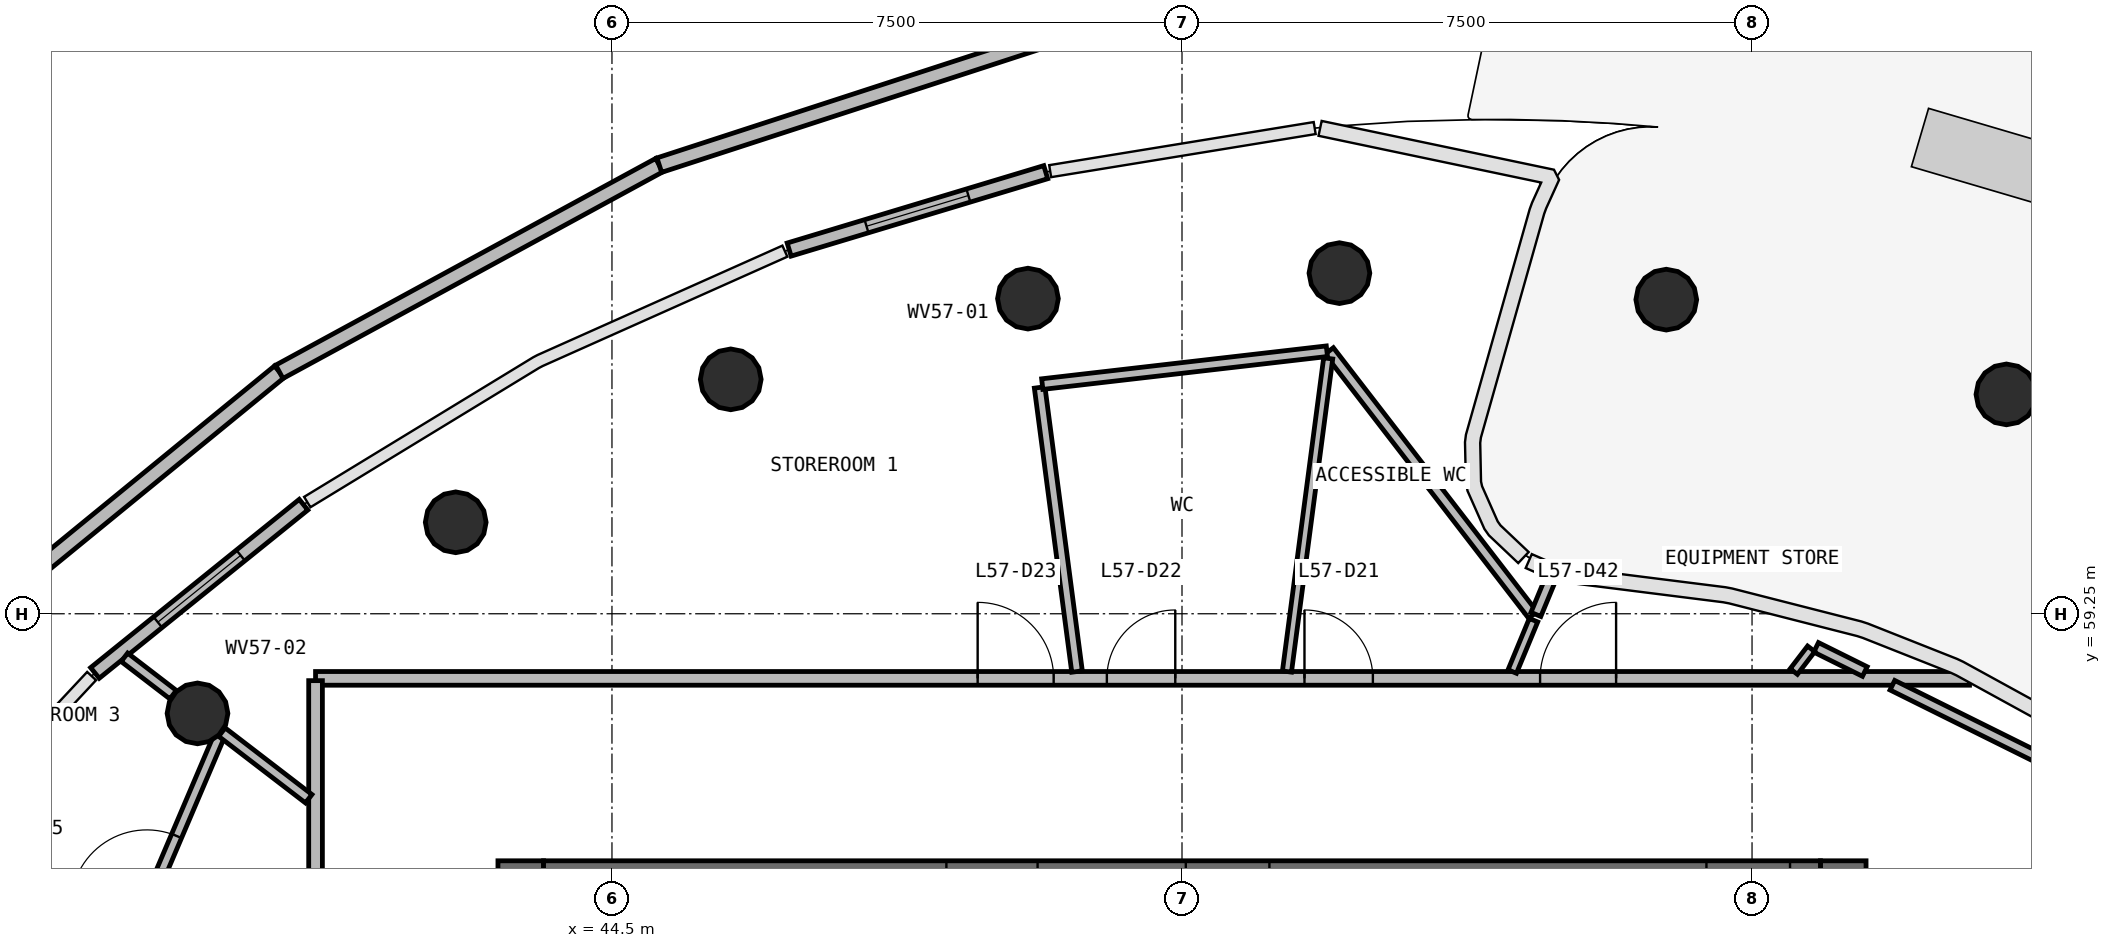
"""IFC4 building model, lengths in metres.
Left out: names, types, materials, properties, quantities, classifications, styles, units other than length and angle.
Written with IfcOpenShell. Run it as: python <this file> out.ifc"""

import sys

from ifc_helpers import new_model, si_unit, direction, frame, frame_2d, origin, origin_2d, place, context, subcontext, project, spatial, rectangle, circle, extrude, source, transform, mapped, element, fill, save


model = new_model("IFC4")
c1 = context("Model", 3, precision=1e-05, world=origin(), true_north=direction((0.0, 1.0)))
c2 = subcontext(c1, "Body", "Model", "MODEL_VIEW")
j1 = project(units=[si_unit("LENGTHUNIT", "METRE"), si_unit("PLANEANGLEUNIT", "RADIAN")], contexts=[c1])
p1 = place(None, origin())
s1 = spatial("IfcSite", under=j1, at=p1, CompositionType="ELEMENT")
p2 = place(p1, origin())
s2 = spatial("IfcBuilding", under=s1, at=p2, CompositionType="ELEMENT")
p3 = place(p2, frame((0.0, 0.0, 234.5)))
s3 = spatial("IfcBuildingStorey", under=s2, at=p3, CompositionType="ELEMENT", Elevation=234.5)
p4 = place(p3, frame((60.7, 40.0, 0.0), z_axis=(0.0, 0.0, 1.0), x_axis=(0.0, 1.0, 0.0)))
e1 = element("IfcWall", 1, at=p4, inside=s3, PredefinedType="SHEAR", context=c2, shape_type="SweptSolid", body=[
    extrude(rectangle(XDim=16.0, YDim=0.6, at=frame_2d((8.0, 0.0))), origin(), (0.0, 0.0, 1.0), 3.9),
])
p5 = place(p4, frame((7.1, 0.0, 0.0)))
e2 = element("IfcOpeningElement", 2, at=p5, cuts=e1, PredefinedType="OPENING", context=c2, shape_type="SweptSolid", body=[
    extrude(rectangle(XDim=1.8, YDim=2.1, at=frame_2d((0.9, 1.05))), frame((0.0, 0.31, 0.0), z_axis=(0.0, -1.0, 0.0), x_axis=(1.0, 0.0, 0.0)), (0.0, 0.0, 1.0), 0.62),
])
p6 = place(p3, frame((43.3, 56.0, 0.0), z_axis=(0.0, 0.0, 1.0), x_axis=(0.0, -1.0, 0.0)))
e3 = element("IfcWall", 3, at=p6, inside=s3, PredefinedType="SHEAR", context=c2, shape_type="SweptSolid", body=[
    extrude(rectangle(XDim=16.0, YDim=0.6, at=frame_2d((8.0, 0.0))), origin(), (0.0, 0.0, 1.0), 3.9),
])
p7 = place(p6, frame((7.1, 0.0, 0.0)))
e4 = element("IfcOpeningElement", 4, at=p7, cuts=e3, PredefinedType="OPENING", context=c2, shape_type="SweptSolid", body=[
    extrude(rectangle(XDim=1.8, YDim=2.1, at=frame_2d((0.9, 1.05))), frame((0.0, 0.31, 0.0), z_axis=(0.0, -1.0, 0.0), x_axis=(1.0, 0.0, 0.0)), (0.0, 0.0, 1.0), 0.62),
])
p8 = place(p3, frame((60.4, 55.7, 0.0), z_axis=(0.0, 0.0, 1.0), x_axis=(-1.0, 0.0, 0.0)))
e5 = element("IfcWall", 5, at=p8, inside=s3, PredefinedType="SHEAR", context=c2, shape_type="SweptSolid", body=[
    extrude(rectangle(XDim=16.8, YDim=0.6, at=frame_2d((8.4, 0.0))), origin(), (0.0, 0.0, 1.0), 3.9),
])
p9 = place(p8, frame((0.4, 0.0, 0.0)))
e6 = element("IfcOpeningElement", 6, at=p9, cuts=e5, PredefinedType="OPENING", context=c2, shape_type="SweptSolid", body=[
    extrude(rectangle(XDim=1.1, YDim=2.1, at=frame_2d((0.55, 1.05))), frame((0.0, 0.31, 0.0), z_axis=(0.0, -1.0, 0.0), x_axis=(1.0, 0.0, 0.0)), (0.0, 0.0, 1.0), 0.62),
])
p10 = place(p8, frame((10.3, 0.0, 0.0)))
e7 = element("IfcOpeningElement", 7, at=p10, cuts=e5, PredefinedType="OPENING", context=c2, shape_type="SweptSolid", body=[
    extrude(rectangle(XDim=1.2, YDim=2.1, at=frame_2d((0.6, 1.05))), frame((0.0, 0.31, 0.0), z_axis=(0.0, -1.0, 0.0), x_axis=(1.0, 0.0, 0.0)), (0.0, 0.0, 1.0), 0.62),
])
p11 = place(p8, frame((7.25, 0.0, 0.0)))
e8 = element("IfcOpeningElement", 8, at=p11, cuts=e5, PredefinedType="OPENING", context=c2, shape_type="SweptSolid", body=[
    extrude(rectangle(XDim=1.1, YDim=2.1, at=frame_2d((0.55, 1.05))), frame((0.0, 0.31, 0.0), z_axis=(0.0, -1.0, 0.0), x_axis=(1.0, 0.0, 0.0)), (0.0, 0.0, 1.0), 0.62),
])
m1 = source(origin(), c2, "Body", "SweptSolid", [
    extrude(circle(Radius=0.4, at=origin_2d()), origin(), (0.0, 0.0, 1.0), 4.22),
])
for number, where, z_axis, x_axis in (
    (9, (62.847, 62.136, -0.32), (0.0, 0.0, 1.0), (1.0, 0.0, 0.0)),
    (10, (58.372, 63.383, -0.32), (0.0, 0.0, 1.0), (1.0, 0.0, 0.0)),
    (11, (54.071, 63.731, -0.32), (0.0, 0.0, 1.0), (1.0, 0.0, 0.0)),
    (12, (49.973, 63.396, -0.32), (0.0, 0.0, 1.0), (1.0, 0.0, 0.0)),
    (13, (46.063, 62.334, -0.32), (0.0, 0.0, 1.0), (1.0, 0.0, 0.0)),
    (14, (42.444, 60.453, -0.32), (0.0, 0.0, 1.0), (1.0, 0.0, 0.0)),
    (15, (39.047, 57.939, -0.32), (0.0, 0.0, 1.0), (1.0, 0.0, 0.0)),
):
    element("IfcColumn", number, at=place(p3, frame(where, z_axis=z_axis, x_axis=x_axis)), inside=s3, PredefinedType="COLUMN", context=c2, shape_type="MappedRepresentation", body=[
        mapped(m1, transform((0.0, 0.0, 0.0), scale=1.0)),
    ])
p12 = place(p3, frame((50.207, 65.059, 0.0), z_axis=(0.0, 0.0, 1.0), x_axis=(-0.957413689823, -0.288719633104, 0.0)))
e16 = element("IfcWall", 16, at=p12, inside=s3, PredefinedType="STANDARD", context=c2, shape_type="SweptSolid", body=[
    extrude(rectangle(XDim=3.526, YDim=0.18, at=frame_2d((1.763, 0.0))), origin(), (0.0, 0.0, 1.0), 3.58),
])
p13 = place(p12, frame((1.063, 0.0, 0.9)))
e17 = element("IfcOpeningElement", 17, at=p13, cuts=e16, PredefinedType="OPENING", context=c2, shape_type="SweptSolid", body=[
    extrude(rectangle(XDim=1.4, YDim=2.0, at=frame_2d((0.7, 1.0))), frame((0.0, 0.1, 0.0), z_axis=(0.0, -1.0, 0.0), x_axis=(1.0, 0.0, 0.0)), (0.0, 0.0, 1.0), 0.2),
])
p14 = place(p3, frame((40.442, 60.685, 0.0), z_axis=(0.0, 0.0, 1.0), x_axis=(-0.77832244361, -0.627864773477, 0.0)))
e18 = element("IfcWall", 18, at=p14, inside=s3, PredefinedType="STANDARD", context=c2, shape_type="SweptSolid", body=[
    extrude(rectangle(XDim=3.526, YDim=0.18, at=frame_2d((1.763, 0.0))), origin(), (0.0, 0.0, 1.0), 3.328),
])
p15 = place(p14, frame((1.063, 0.0, 0.9)))
e19 = element("IfcOpeningElement", 19, at=p15, cuts=e18, PredefinedType="OPENING", context=c2, shape_type="SweptSolid", body=[
    extrude(rectangle(XDim=1.4, YDim=2.0, at=frame_2d((0.7, 1.0))), frame((0.0, 0.1, 0.0), z_axis=(0.0, -1.0, 0.0), x_axis=(1.0, 0.0, 0.0)), (0.0, 0.0, 1.0), 0.2),
])
p16 = place(p3, frame((35.719, 58.832, 0.0), z_axis=(0.0, 0.0, 1.0), x_axis=(0.77415990789, 0.632990076554, 0.0)))
e20 = element("IfcWall", 20, at=p16, inside=s3, PredefinedType="PARAPET", context=c2, shape_type="SweptSolid", body=[
    extrude(rectangle(XDim=5.69, YDim=0.2, at=frame_2d((2.845, 0.0))), origin(), (0.0, 0.0, 1.0), 1.1),
])
p17 = place(p3, frame((40.124, 62.433, 0.0), z_axis=(0.0, 0.0, 1.0), x_axis=(0.878476952586, 0.477784725348, 0.0)))
e21 = element("IfcWall", 21, at=p17, inside=s3, PredefinedType="PARAPET", context=c2, shape_type="SweptSolid", body=[
    extrude(rectangle(XDim=5.691, YDim=0.2, at=frame_2d((2.845, 0.0))), origin(), (0.0, 0.0, 1.0), 1.1),
])
p18 = place(p3, frame((45.123, 65.152, 0.0), z_axis=(0.0, 0.0, 1.0), x_axis=(0.950936910484, 0.309384861103, 0.0)))
e22 = element("IfcWall", 22, at=p18, inside=s3, PredefinedType="PARAPET", context=c2, shape_type="SweptSolid", body=[
    extrude(rectangle(XDim=5.69, YDim=0.2, at=frame_2d((2.845, 0.0))), origin(), (0.0, 0.0, 1.0), 1.1),
])
p19 = place(p3, frame((40.6, 58.4, 0.0), z_axis=(0.0, 0.0, 1.0), x_axis=(1.0, 0.0, 0.0)))
e23 = element("IfcWall", 23, at=p19, inside=s3, PredefinedType="PARTITIONING", context=c2, shape_type="SweptSolid", body=[
    extrude(rectangle(XDim=21.761, YDim=0.18, at=frame_2d((10.881, 0.0))), origin(), (0.0, 0.0, 1.0), 2.88),
])
p20 = place(p19, frame((13.011, 0.0, 0.0)))
e24 = element("IfcOpeningElement", 24, at=p20, cuts=e23, PredefinedType="OPENING", context=c2, shape_type="SweptSolid", body=[
    extrude(rectangle(XDim=0.9, YDim=2.1, at=frame_2d((0.45, 1.05))), frame((0.0, 0.1, 0.0), z_axis=(0.0, -1.0, 0.0), x_axis=(1.0, 0.0, 0.0)), (0.0, 0.0, 1.0), 0.2),
])
p21 = place(p19, frame((10.411, 0.0, 0.0)))
e25 = element("IfcOpeningElement", 25, at=p21, cuts=e23, PredefinedType="OPENING", context=c2, shape_type="SweptSolid", body=[
    extrude(rectangle(XDim=0.9, YDim=2.1, at=frame_2d((0.45, 1.05))), frame((0.0, 0.1, 0.0), z_axis=(0.0, -1.0, 0.0), x_axis=(1.0, 0.0, 0.0)), (0.0, 0.0, 1.0), 0.2),
])
p22 = place(p19, frame((8.711, 0.0, 0.0)))
e26 = element("IfcOpeningElement", 26, at=p22, cuts=e23, PredefinedType="OPENING", context=c2, shape_type="SweptSolid", body=[
    extrude(rectangle(XDim=1.0, YDim=2.1, at=frame_2d((0.5, 1.05))), frame((0.0, 0.1, 0.0), z_axis=(0.0, -1.0, 0.0), x_axis=(1.0, 0.0, 0.0)), (0.0, 0.0, 1.0), 0.2),
])
p23 = place(p19, frame((16.111, 0.0, 0.0)))
e27 = element("IfcOpeningElement", 27, at=p23, cuts=e23, PredefinedType="OPENING", context=c2, shape_type="SweptSolid", body=[
    extrude(rectangle(XDim=1.0, YDim=2.1, at=frame_2d((0.5, 1.05))), frame((0.0, 0.1, 0.0), z_axis=(0.0, -1.0, 0.0), x_axis=(1.0, 0.0, 0.0)), (0.0, 0.0, 1.0), 0.2),
])
p24 = place(p3, frame((40.6, 37.63, 0.0), z_axis=(0.0, 0.0, 1.0), x_axis=(0.0, 1.0, 0.0)))
e28 = element("IfcWall", 28, at=p24, inside=s3, PredefinedType="PARTITIONING", context=c2, shape_type="SweptSolid", body=[
    extrude(rectangle(XDim=20.74, YDim=0.18, at=frame_2d((10.37, 0.0))), origin(), (0.0, 0.0, 1.0), 2.88),
])
p25 = place(p24, frame((9.89, 0.0, 0.0)))
e29 = element("IfcOpeningElement", 29, at=p25, cuts=e28, PredefinedType="OPENING", context=c2, shape_type="SweptSolid", body=[
    extrude(rectangle(XDim=1.0, YDim=2.1, at=frame_2d((0.5, 1.05))), frame((0.0, 0.1, 0.0), z_axis=(0.0, -1.0, 0.0), x_axis=(1.0, 0.0, 0.0)), (0.0, 0.0, 1.0), 0.2),
])
p26 = place(p24, frame((7.69, 0.0, 0.0)))
e30 = element("IfcOpeningElement", 30, at=p26, cuts=e28, PredefinedType="OPENING", context=c2, shape_type="SweptSolid", body=[
    extrude(rectangle(XDim=1.0, YDim=2.1, at=frame_2d((0.5, 1.05))), frame((0.0, 0.1, 0.0), z_axis=(0.0, -1.0, 0.0), x_axis=(1.0, 0.0, 0.0)), (0.0, 0.0, 1.0), 0.2),
])
p27 = place(p3, frame((56.616, 59.234, 0.0), z_axis=(0.0, 0.0, 1.0), x_axis=(-0.610799466813, 0.791785331603, 0.0)))
e31 = element("IfcWall", 31, at=p27, inside=s3, PredefinedType="PARTITIONING", context=c2, shape_type="SweptSolid", body=[
    extrude(rectangle(XDim=4.387, YDim=0.14, at=frame_2d((2.193, 0.0))), origin(), (0.0, 0.0, 1.0), 2.88),
])
p28 = place(p3, frame((37.741, 53.906, 0.0), z_axis=(0.0, 0.0, 1.0), x_axis=(0.391990538721, 0.919969248156, 0.0)))
e32 = element("IfcWall", 32, at=p28, inside=s3, PredefinedType="PARTITIONING", context=c2, shape_type="SweptSolid", body=[
    extrude(rectangle(XDim=4.081, YDim=0.14, at=frame_2d((2.041, 0.0))), origin(), (0.0, 0.0, 1.0), 2.88),
])
p29 = place(p28, frame((1.631, 0.0, 0.0)))
e33 = element("IfcOpeningElement", 33, at=p29, cuts=e32, PredefinedType="OPENING", context=c2, shape_type="SweptSolid", body=[
    extrude(rectangle(XDim=1.0, YDim=2.1, at=frame_2d((0.5, 1.05))), frame((0.0, 0.08, 0.0), z_axis=(0.0, -1.0, 0.0), x_axis=(1.0, 0.0, 0.0)), (0.0, 0.0, 1.0), 0.16),
])
p30 = place(p3, frame((50.619, 58.49, 0.0), z_axis=(0.0, 0.0, 1.0), x_axis=(-0.130504773783, 0.991447680929, 0.0)))
e34 = element("IfcWall", 34, at=p30, inside=s3, PredefinedType="PARTITIONING", context=c2, shape_type="SweptSolid", body=[
    extrude(rectangle(XDim=3.77, YDim=0.14, at=frame_2d((1.885, 0.0))), origin(), (0.0, 0.0, 1.0), 2.88),
])
p31 = place(p3, frame((53.906, 62.704, 0.0), z_axis=(0.0, 0.0, 1.0), x_axis=(-0.993401559809, -0.114688015803, 0.0)))
e35 = element("IfcWall", 35, at=p31, inside=s3, PredefinedType="PARTITIONING", context=c2, shape_type="SweptSolid", body=[
    extrude(rectangle(XDim=3.77, YDim=0.14, at=frame_2d((1.885, 0.0))), origin(), (0.0, 0.0, 1.0), 2.88),
])
p32 = place(p3, frame((63.31, 57.335, 0.0), z_axis=(0.0, 0.0, 1.0), x_axis=(-0.895715462777, 0.444627720394, 0.0)))
e36 = element("IfcWall", 36, at=p32, inside=s3, PredefinedType="PARTITIONING", context=c2, shape_type="SweptSolid", body=[
    extrude(rectangle(XDim=2.192, YDim=0.14, at=frame_2d((1.096, 0.0))), origin(), (0.0, 0.0, 1.0), 2.88),
])
p33 = place(p3, frame((40.51, 56.817, 0.0), z_axis=(0.0, 0.0, 1.0), x_axis=(-0.793316945216, 0.608808857059, 0.0)))
e37 = element("IfcWall", 37, at=p33, inside=s3, PredefinedType="PARTITIONING", context=c2, shape_type="SweptSolid", body=[
    extrude(rectangle(XDim=1.44, YDim=0.14, at=frame_2d((0.72, 0.0))), origin(), (0.0, 0.0, 1.0), 2.88),
])
p34 = place(p3, frame((60.984, 58.49, 0.0), z_axis=(0.0, 0.0, 1.0), x_axis=(-0.895720092889, 0.444618392775, 0.0)))
e38 = element("IfcWall", 38, at=p34, inside=s3, PredefinedType="PARTITIONING", context=c2, shape_type="SweptSolid", body=[
    extrude(rectangle(XDim=0.716, YDim=0.14, at=frame_2d((0.358, 0.0))), origin(), (0.0, 0.0, 1.0), 2.88),
])
p35 = place(p3, frame((38.726, 58.186, 0.0), z_axis=(0.0, 0.0, 1.0), x_axis=(-0.793387400676, 0.60871703808, 0.0)))
e39 = element("IfcWall", 39, at=p35, inside=s3, PredefinedType="PARTITIONING", context=c2, shape_type="SweptSolid", body=[
    extrude(rectangle(XDim=0.808, YDim=0.14, at=frame_2d((0.404, 0.0))), origin(), (0.0, 0.0, 1.0), 2.88),
])
p36 = place(p3, frame((56.656, 59.241, 0.0), z_axis=(0.0, 0.0, 1.0), x_axis=(0.382646127148, 0.923894983956, 0.0)))
e40 = element("IfcWall", 40, at=p36, inside=s3, PredefinedType="PARTITIONING", context=c2, shape_type="SweptSolid", body=[
    extrude(rectangle(XDim=0.537, YDim=0.14, at=frame_2d((0.269, 0.0))), origin(), (0.0, 0.0, 1.0), 2.88),
])
p37 = place(p3, frame((53.381, 58.49, 0.0), z_axis=(0.0, 0.0, 1.0), x_axis=(0.130504671909, 0.991447694339, 0.0)))
e41 = element("IfcWall", 41, at=p37, inside=s3, PredefinedType="PARTITIONING", context=c2, shape_type="SweptSolid", body=[
    extrude(rectangle(XDim=4.155, YDim=0.12, at=frame_2d((2.078, 0.0))), origin(), (0.0, 0.0, 1.0), 2.88),
])
p38 = place(p3, frame((56.345, 58.49, 0.0), z_axis=(0.0, 0.0, 1.0), x_axis=(0.382646687913, 0.923894751706, 0.0)))
e42 = element("IfcWall", 42, at=p38, inside=s3, PredefinedType="PARTITIONING", context=c2, shape_type="SweptSolid", body=[
    extrude(rectangle(XDim=0.731, YDim=0.12, at=frame_2d((0.366, 0.0))), origin(), (0.0, 0.0, 1.0), 2.88),
])
p39 = place(p3, frame((60.049, 58.49, 0.0), z_axis=(0.0, 0.0, 1.0), x_axis=(0.608676467498, 0.793418526324, 0.0)))
e43 = element("IfcWall", 43, at=p39, inside=s3, PredefinedType="PARTITIONING", context=c2, shape_type="SweptSolid", body=[
    extrude(rectangle(XDim=0.377, YDim=0.12, at=frame_2d((0.188, 0.0))), origin(), (0.0, 0.0, 1.0), 2.88),
])
m2 = source(origin(), c2, "Body", "SweptSolid", [
    extrude(rectangle(XDim=1.4, YDim=2.0, at=frame_2d((0.7, 1.0))), frame((0.0, 0.03, 0.0), z_axis=(0.0, -1.0, 0.0), x_axis=(1.0, 0.0, 0.0)), (0.0, 0.0, 1.0), 0.06),
])
p40 = place(p13, origin())
e44 = element("IfcWindow", 44, at=p40, inside=s3, PartitioningType="SINGLE_PANEL", PredefinedType="WINDOW", context=c2, shape_type="MappedRepresentation", body=[
    mapped(m2, transform((0.0, 0.0, 0.0), scale=1.0)),
])
fill(e17, e44)
p41 = place(p15, origin())
e45 = element("IfcWindow", 45, at=p41, inside=s3, PartitioningType="SINGLE_PANEL", PredefinedType="WINDOW", context=c2, shape_type="MappedRepresentation", body=[
    mapped(m2, transform((0.0, 0.0, 0.0), scale=1.0)),
])
fill(e19, e45)
m3 = source(origin(), c2, "Body", "SweptSolid", [
    extrude(rectangle(XDim=0.9, YDim=2.1, at=frame_2d((0.45, 1.05))), frame((0.0, 0.025, 0.0), z_axis=(0.0, -1.0, 0.0), x_axis=(1.0, 0.0, 0.0)), (0.0, 0.0, 1.0), 0.05),
])
p42 = place(p20, origin())
e46 = element("IfcDoor", 46, at=p42, inside=s3, OperationType="SINGLE_SWING_LEFT", PredefinedType="DOOR", context=c2, shape_type="MappedRepresentation", body=[
    mapped(m3, transform((0.0, 0.0, 0.0), scale=1.0)),
])
fill(e24, e46)
p43 = place(p21, origin())
e47 = element("IfcDoor", 47, at=p43, inside=s3, OperationType="SINGLE_SWING_RIGHT", PredefinedType="DOOR", context=c2, shape_type="MappedRepresentation", body=[
    mapped(m3, transform((0.0, 0.0, 0.0), scale=1.0)),
])
fill(e25, e47)
m4 = source(origin(), c2, "Body", "SweptSolid", [
    extrude(rectangle(XDim=1.0, YDim=2.1, at=frame_2d((0.5, 1.05))), frame((0.0, 0.025, 0.0), z_axis=(0.0, -1.0, 0.0), x_axis=(1.0, 0.0, 0.0)), (0.0, 0.0, 1.0), 0.05),
])
p44 = place(p22, origin())
e48 = element("IfcDoor", 48, at=p44, inside=s3, OperationType="SINGLE_SWING_LEFT", PredefinedType="DOOR", context=c2, shape_type="MappedRepresentation", body=[
    mapped(m4, transform((0.0, 0.0, 0.0), scale=1.0)),
])
fill(e26, e48)
p45 = place(p29, origin())
e49 = element("IfcDoor", 49, at=p45, inside=s3, OperationType="SINGLE_SWING_LEFT", PredefinedType="DOOR", context=c2, shape_type="MappedRepresentation", body=[
    mapped(m4, transform((0.0, 0.0, 0.0), scale=1.0)),
])
fill(e33, e49)
p46 = place(p23, origin())
e50 = element("IfcDoor", 50, at=p46, inside=s3, OperationType="SINGLE_SWING_RIGHT", PredefinedType="DOOR", context=c2, shape_type="MappedRepresentation", body=[
    mapped(m4, transform((0.0, 0.0, 0.0), scale=1.0)),
])
fill(e27, e50)
save(model, sys.argv[1])
